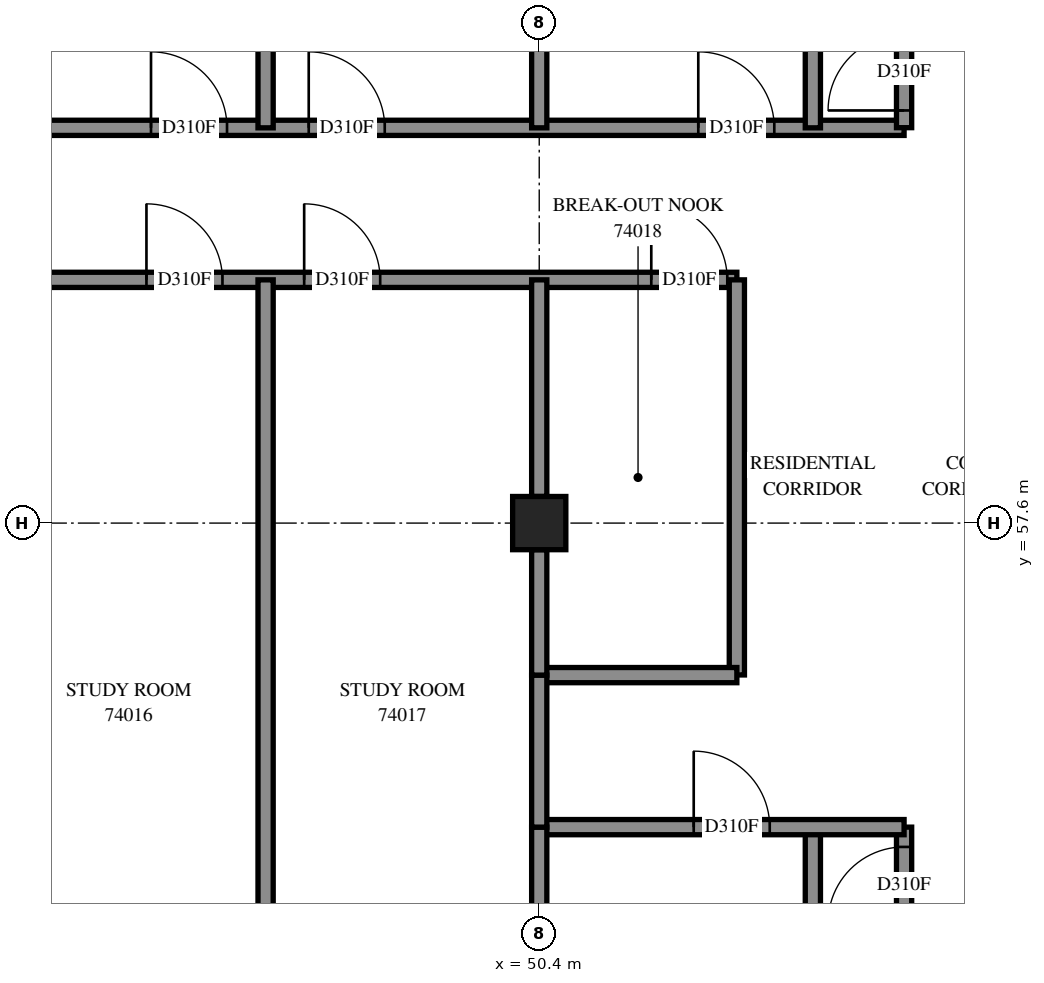
"""IFC4 building model, lengths in metres.
Left out: names, types, materials, properties, quantities, classifications, styles, units other than length and angle.
Written with IfcOpenShell. Run it as: python <this file> out.ifc"""

import sys

from ifc_helpers import new_model, si_unit, direction, frame, frame_2d, origin, origin_2d, place, context, subcontext, project, spatial, rectangle, extrude, element, fill, save


model = new_model("IFC4")
c1 = context("Model", 3, precision=1e-05, world=origin(), true_north=direction((0.0, 1.0)))
c2 = subcontext(c1, "Body", "Model", "MODEL_VIEW")
j1 = project(units=[si_unit("LENGTHUNIT", "METRE"), si_unit("PLANEANGLEUNIT", "RADIAN")], contexts=[c1])
p1 = place(None, origin())
s1 = spatial("IfcSite", under=j1, at=p1, CompositionType="ELEMENT")
p2 = place(p1, origin())
s2 = spatial("IfcBuilding", under=s1, at=p2, CompositionType="ELEMENT")
p3 = place(p2, frame((0.0, 0.0, 271.0)))
s3 = spatial("IfcBuildingStorey", under=s2, at=p3, CompositionType="ELEMENT", Elevation=271.0)
p4 = place(p3, frame((50.4, 57.6, 0.0), z_axis=(0.0, 0.0, 1.0), x_axis=(1.0, 0.0, 0.0)))
e1 = element("IfcColumn", 1, at=p4, inside=s3, PredefinedType="COLUMN", context=c2, shape_type="SweptSolid", body=[
    extrude(rectangle(XDim=0.7, YDim=0.7, at=origin_2d()), origin(), (0.0, 0.0, 1.0), 3.1),
])
p5 = place(p3, frame((36.002, 60.8, 0.0), z_axis=(0.0, 0.0, 1.0), x_axis=(1.0, 0.0, 0.0)))
e2 = element("IfcWall", 2, at=p5, inside=s3, PredefinedType="PARTITIONING", context=c2, shape_type="SweptSolid", body=[
    extrude(rectangle(XDim=16.998, YDim=0.2, at=frame_2d((8.499, 0.0))), origin(), (0.0, 0.0, 1.0), 3.1),
])
p6 = place(p5, frame((4.123, 0.0, 0.0)))
e3 = element("IfcOpeningElement", 3, at=p6, cuts=e2, PredefinedType="OPENING", context=c2, shape_type="SweptSolid", body=[
    extrude(rectangle(XDim=1.0, YDim=2.1, at=frame_2d((0.5, 1.05))), frame((0.0, 0.11, 0.0), z_axis=(0.0, -1.0, 0.0), x_axis=(1.0, 0.0, 0.0)), (0.0, 0.0, 1.0), 0.22),
])
p7 = place(p5, frame((9.23, 0.0, 0.0)))
e4 = element("IfcOpeningElement", 4, at=p7, cuts=e2, PredefinedType="OPENING", context=c2, shape_type="SweptSolid", body=[
    extrude(rectangle(XDim=1.0, YDim=2.1, at=frame_2d((0.5, 1.05))), frame((0.0, 0.11, 0.0), z_axis=(0.0, -1.0, 0.0), x_axis=(1.0, 0.0, 0.0)), (0.0, 0.0, 1.0), 0.22),
])
p8 = place(p5, frame((11.306, 0.0, 0.0)))
e5 = element("IfcOpeningElement", 5, at=p8, cuts=e2, PredefinedType="OPENING", context=c2, shape_type="SweptSolid", body=[
    extrude(rectangle(XDim=1.0, YDim=2.1, at=frame_2d((0.5, 1.05))), frame((0.0, 0.11, 0.0), z_axis=(0.0, -1.0, 0.0), x_axis=(1.0, 0.0, 0.0)), (0.0, 0.0, 1.0), 0.22),
])
p9 = place(p5, frame((15.872, 0.0, 0.0)))
e6 = element("IfcOpeningElement", 6, at=p9, cuts=e2, PredefinedType="OPENING", context=c2, shape_type="SweptSolid", body=[
    extrude(rectangle(XDim=1.0, YDim=2.1, at=frame_2d((0.5, 1.05))), frame((0.0, 0.11, 0.0), z_axis=(0.0, -1.0, 0.0), x_axis=(1.0, 0.0, 0.0)), (0.0, 0.0, 1.0), 0.22),
])
p10 = place(p3, frame((40.602, 62.8, 0.0), z_axis=(0.0, 0.0, 1.0), x_axis=(1.0, 0.0, 0.0)))
e7 = element("IfcWall", 7, at=p10, inside=s3, PredefinedType="PARTITIONING", context=c2, shape_type="SweptSolid", body=[
    extrude(rectangle(XDim=14.598, YDim=0.2, at=frame_2d((7.299, 0.0))), origin(), (0.0, 0.0, 1.0), 3.1),
])
p11 = place(p10, frame((0.124, 0.0, 0.0)))
e8 = element("IfcOpeningElement", 8, at=p11, cuts=e7, PredefinedType="OPENING", context=c2, shape_type="SweptSolid", body=[
    extrude(rectangle(XDim=1.0, YDim=2.1, at=frame_2d((0.5, 1.05))), frame((0.0, 0.11, 0.0), z_axis=(0.0, -1.0, 0.0), x_axis=(1.0, 0.0, 0.0)), (0.0, 0.0, 1.0), 0.22),
])
p12 = place(p10, frame((4.691, 0.0, 0.0)))
e9 = element("IfcOpeningElement", 9, at=p12, cuts=e7, PredefinedType="OPENING", context=c2, shape_type="SweptSolid", body=[
    extrude(rectangle(XDim=1.0, YDim=2.1, at=frame_2d((0.5, 1.05))), frame((0.0, 0.11, 0.0), z_axis=(0.0, -1.0, 0.0), x_axis=(1.0, 0.0, 0.0)), (0.0, 0.0, 1.0), 0.22),
])
p13 = place(p10, frame((6.766, 0.0, 0.0)))
e10 = element("IfcOpeningElement", 10, at=p13, cuts=e7, PredefinedType="OPENING", context=c2, shape_type="SweptSolid", body=[
    extrude(rectangle(XDim=1.0, YDim=2.1, at=frame_2d((0.5, 1.05))), frame((0.0, 0.11, 0.0), z_axis=(0.0, -1.0, 0.0), x_axis=(1.0, 0.0, 0.0)), (0.0, 0.0, 1.0), 0.22),
])
p14 = place(p10, frame((11.89, 0.0, 0.0)))
e11 = element("IfcOpeningElement", 11, at=p14, cuts=e7, PredefinedType="OPENING", context=c2, shape_type="SweptSolid", body=[
    extrude(rectangle(XDim=1.0, YDim=2.1, at=frame_2d((0.5, 1.05))), frame((0.0, 0.11, 0.0), z_axis=(0.0, -1.0, 0.0), x_axis=(1.0, 0.0, 0.0)), (0.0, 0.0, 1.0), 0.22),
])
p15 = place(p3, frame((54.0, 42.277, 0.0), z_axis=(0.0, 0.0, 1.0), x_axis=(0.0, 1.0, 0.0)))
e12 = element("IfcWall", 12, at=p15, inside=s3, PredefinedType="PARTITIONING", context=c2, shape_type="SweptSolid", body=[
    extrude(rectangle(XDim=11.323, YDim=0.2, at=frame_2d((5.662, 0.0))), origin(), (0.0, 0.0, 1.0), 3.1),
])
p16 = place(p3, frame((46.8, 49.65, 0.0), z_axis=(0.0, 0.0, 1.0), x_axis=(0.0, 1.0, 0.0)))
e13 = element("IfcWall", 13, at=p16, inside=s3, PredefinedType="PARTITIONING", context=c2, shape_type="SweptSolid", body=[
    extrude(rectangle(XDim=11.15, YDim=0.2, at=frame_2d((5.575, 0.0))), origin(), (0.0, 0.0, 1.0), 3.1),
])
p17 = place(p3, frame((46.8, 62.8, 0.0), z_axis=(0.0, 0.0, 1.0), x_axis=(0.0, 1.0, 0.0)))
e14 = element("IfcWall", 14, at=p17, inside=s3, PredefinedType="PARTITIONING", context=c2, shape_type="SweptSolid", body=[
    extrude(rectangle(XDim=10.109, YDim=0.2, at=frame_2d((5.055, 0.0))), origin(), (0.0, 0.0, 1.0), 3.1),
])
p18 = place(p3, frame((54.0, 62.8, 0.0), z_axis=(0.0, 0.0, 1.0), x_axis=(0.0, 1.0, 0.0)))
e15 = element("IfcWall", 15, at=p18, inside=s3, PredefinedType="PARTITIONING", context=c2, shape_type="SweptSolid", body=[
    extrude(rectangle(XDim=10.042, YDim=0.2, at=frame_2d((5.021, 0.0))), origin(), (0.0, 0.0, 1.0), 3.1),
])
p19 = place(p3, frame((55.2, 48.0, 0.0), z_axis=(0.0, 0.0, 1.0), x_axis=(0.0, 1.0, 0.0)))
e16 = element("IfcWall", 16, at=p19, inside=s3, PredefinedType="PARTITIONING", context=c2, shape_type="SweptSolid", body=[
    extrude(rectangle(XDim=5.6, YDim=0.2, at=frame_2d((2.8, 0.0))), origin(), (0.0, 0.0, 1.0), 3.1),
])
p20 = place(p19, frame((4.34, 0.0, 0.0)))
e17 = element("IfcOpeningElement", 17, at=p20, cuts=e16, PredefinedType="OPENING", context=c2, shape_type="SweptSolid", body=[
    extrude(rectangle(XDim=1.0, YDim=2.1, at=frame_2d((0.5, 1.05))), frame((0.0, 0.11, 0.0), z_axis=(0.0, -1.0, 0.0), x_axis=(1.0, 0.0, 0.0)), (0.0, 0.0, 1.0), 0.22),
])
p21 = place(p3, frame((53.0, 55.602, 0.0), z_axis=(0.0, 0.0, 1.0), x_axis=(0.0, 1.0, 0.0)))
e18 = element("IfcWall", 18, at=p21, inside=s3, PredefinedType="PARTITIONING", context=c2, shape_type="SweptSolid", body=[
    extrude(rectangle(XDim=5.198, YDim=0.2, at=frame_2d((2.599, 0.0))), origin(), (0.0, 0.0, 1.0), 3.1),
])
p22 = place(p3, frame((50.4, 53.6, 0.0), z_axis=(0.0, 0.0, 1.0), x_axis=(1.0, 0.0, 0.0)))
e19 = element("IfcWall", 19, at=p22, inside=s3, PredefinedType="PARTITIONING", context=c2, shape_type="SweptSolid", body=[
    extrude(rectangle(XDim=4.8, YDim=0.2, at=frame_2d((2.4, 0.0))), origin(), (0.0, 0.0, 1.0), 3.1),
])
p23 = place(p22, frame((2.033, 0.0, 0.0)))
e20 = element("IfcOpeningElement", 20, at=p23, cuts=e19, PredefinedType="OPENING", context=c2, shape_type="SweptSolid", body=[
    extrude(rectangle(XDim=1.0, YDim=2.1, at=frame_2d((0.5, 1.05))), frame((0.0, 0.11, 0.0), z_axis=(0.0, -1.0, 0.0), x_axis=(1.0, 0.0, 0.0)), (0.0, 0.0, 1.0), 0.22),
])
p24 = place(p3, frame((55.2, 62.802, 0.0), z_axis=(0.0, 0.0, 1.0), x_axis=(0.0, 1.0, 0.0)))
e21 = element("IfcWall", 21, at=p24, inside=s3, PredefinedType="PARTITIONING", context=c2, shape_type="SweptSolid", body=[
    extrude(rectangle(XDim=4.398, YDim=0.2, at=frame_2d((2.199, 0.0))), origin(), (0.0, 0.0, 1.0), 3.1),
])
p25 = place(p24, frame((0.227, 0.0, 0.0)))
e22 = element("IfcOpeningElement", 22, at=p25, cuts=e21, PredefinedType="OPENING", context=c2, shape_type="SweptSolid", body=[
    extrude(rectangle(XDim=1.0, YDim=2.1, at=frame_2d((0.5, 1.05))), frame((0.0, 0.11, 0.0), z_axis=(0.0, -1.0, 0.0), x_axis=(1.0, 0.0, 0.0)), (0.0, 0.0, 1.0), 0.22),
])
for number, where, z_axis, x_axis in (
    (23, (50.4, 50.75, 0.0), (0.0, 0.0, 1.0), (0.0, 1.0, 0.0)),
    (24, (50.4, 57.95, 0.0), (0.0, 0.0, 1.0), (0.0, 1.0, 0.0)),
):
    element("IfcWall", number, at=place(p3, frame(where, z_axis=z_axis, x_axis=x_axis)), inside=s3, PredefinedType="PARTITIONING", context=c2, shape_type="SweptSolid", body=[
        extrude(rectangle(XDim=2.85, YDim=0.2, at=frame_2d((1.425, 0.0))), origin(), (0.0, 0.0, 1.0), 3.1),
    ])
p26 = place(p3, frame((50.4, 55.6, 0.0), z_axis=(0.0, 0.0, 1.0), x_axis=(1.0, 0.0, 0.0)))
e25 = element("IfcWall", 25, at=p26, inside=s3, PredefinedType="PARTITIONING", context=c2, shape_type="SweptSolid", body=[
    extrude(rectangle(XDim=2.6, YDim=0.2, at=frame_2d((1.3, 0.0))), origin(), (0.0, 0.0, 1.0), 3.1),
])
p27 = place(p3, frame((50.4, 53.6, 0.0), z_axis=(0.0, 0.0, 1.0), x_axis=(0.0, 1.0, 0.0)))
e26 = element("IfcWall", 26, at=p27, inside=s3, PredefinedType="PARTITIONING", context=c2, shape_type="SweptSolid", body=[
    extrude(rectangle(XDim=2.0, YDim=0.2, at=frame_2d((1.0, 0.0))), origin(), (0.0, 0.0, 1.0), 3.1),
])
for number, where, z_axis, x_axis in (
    (27, (50.4, 62.8, 0.0), (0.0, 0.0, 1.0), (0.0, 1.0, 0.0)),
    (28, (50.4, 55.6, 0.0), (0.0, 0.0, 1.0), (0.0, 1.0, 0.0)),
):
    element("IfcWall", number, at=place(p3, frame(where, z_axis=z_axis, x_axis=x_axis)), inside=s3, PredefinedType="PARTITIONING", context=c2, shape_type="SweptSolid", body=[
        extrude(rectangle(XDim=1.65, YDim=0.2, at=frame_2d((0.825, 0.0))), origin(), (0.0, 0.0, 1.0), 3.1),
    ])
p28 = place(p7, origin())
e29 = element("IfcDoor", 29, at=p28, inside=s3, OperationType="SINGLE_SWING_LEFT", PredefinedType="DOOR", context=c2, shape_type="SweptSolid", body=[
    extrude(rectangle(XDim=1.0, YDim=2.1, at=frame_2d((0.5, 1.05))), frame((0.0, 0.025, 0.0), z_axis=(0.0, -1.0, 0.0), x_axis=(1.0, 0.0, 0.0)), (0.0, 0.0, 1.0), 0.05),
])
fill(e4, e29)
p29 = place(p8, origin())
e30 = element("IfcDoor", 30, at=p29, inside=s3, OperationType="SINGLE_SWING_RIGHT", PredefinedType="DOOR", context=c2, shape_type="SweptSolid", body=[
    extrude(rectangle(XDim=1.0, YDim=2.1, at=frame_2d((0.5, 1.05))), frame((0.0, 0.025, 0.0), z_axis=(0.0, -1.0, 0.0), x_axis=(1.0, 0.0, 0.0)), (0.0, 0.0, 1.0), 0.05),
])
fill(e5, e30)
p30 = place(p9, origin())
e31 = element("IfcDoor", 31, at=p30, inside=s3, OperationType="SINGLE_SWING_LEFT", PredefinedType="DOOR", context=c2, shape_type="SweptSolid", body=[
    extrude(rectangle(XDim=1.0, YDim=2.1, at=frame_2d((0.5, 1.05))), frame((0.0, 0.025, 0.0), z_axis=(0.0, -1.0, 0.0), x_axis=(1.0, 0.0, 0.0)), (0.0, 0.0, 1.0), 0.05),
])
fill(e6, e31)
p31 = place(p23, origin())
e32 = element("IfcDoor", 32, at=p31, inside=s3, OperationType="SINGLE_SWING_LEFT", PredefinedType="DOOR", context=c2, shape_type="SweptSolid", body=[
    extrude(rectangle(XDim=1.0, YDim=2.1, at=frame_2d((0.5, 1.05))), frame((0.0, 0.025, 0.0), z_axis=(0.0, -1.0, 0.0), x_axis=(1.0, 0.0, 0.0)), (0.0, 0.0, 1.0), 0.05),
])
fill(e20, e32)
p32 = place(p20, origin())
e33 = element("IfcDoor", 33, at=p32, inside=s3, OperationType="SINGLE_SWING_RIGHT", PredefinedType="DOOR", context=c2, shape_type="SweptSolid", body=[
    extrude(rectangle(XDim=1.0, YDim=2.1, at=frame_2d((0.5, 1.05))), frame((0.0, 0.025, 0.0), z_axis=(0.0, -1.0, 0.0), x_axis=(1.0, 0.0, 0.0)), (0.0, 0.0, 1.0), 0.05),
])
fill(e17, e33)
p33 = place(p12, origin())
e34 = element("IfcDoor", 34, at=p33, inside=s3, OperationType="SINGLE_SWING_RIGHT", PredefinedType="DOOR", context=c2, shape_type="SweptSolid", body=[
    extrude(rectangle(XDim=1.0, YDim=2.1, at=frame_2d((0.5, 1.05))), frame((0.0, 0.025, 0.0), z_axis=(0.0, -1.0, 0.0), x_axis=(1.0, 0.0, 0.0)), (0.0, 0.0, 1.0), 0.05),
])
fill(e9, e34)
p34 = place(p13, origin())
e35 = element("IfcDoor", 35, at=p34, inside=s3, OperationType="SINGLE_SWING_LEFT", PredefinedType="DOOR", context=c2, shape_type="SweptSolid", body=[
    extrude(rectangle(XDim=1.0, YDim=2.1, at=frame_2d((0.5, 1.05))), frame((0.0, 0.025, 0.0), z_axis=(0.0, -1.0, 0.0), x_axis=(1.0, 0.0, 0.0)), (0.0, 0.0, 1.0), 0.05),
])
fill(e10, e35)
p35 = place(p14, origin())
e36 = element("IfcDoor", 36, at=p35, inside=s3, OperationType="SINGLE_SWING_RIGHT", PredefinedType="DOOR", context=c2, shape_type="SweptSolid", body=[
    extrude(rectangle(XDim=1.0, YDim=2.1, at=frame_2d((0.5, 1.05))), frame((0.0, 0.025, 0.0), z_axis=(0.0, -1.0, 0.0), x_axis=(1.0, 0.0, 0.0)), (0.0, 0.0, 1.0), 0.05),
])
fill(e11, e36)
p36 = place(p25, origin())
e37 = element("IfcDoor", 37, at=p36, inside=s3, OperationType="SINGLE_SWING_LEFT", PredefinedType="DOOR", context=c2, shape_type="SweptSolid", body=[
    extrude(rectangle(XDim=1.0, YDim=2.1, at=frame_2d((0.5, 1.05))), frame((0.0, 0.025, 0.0), z_axis=(0.0, -1.0, 0.0), x_axis=(1.0, 0.0, 0.0)), (0.0, 0.0, 1.0), 0.05),
])
fill(e22, e37)
save(model, sys.argv[1])
